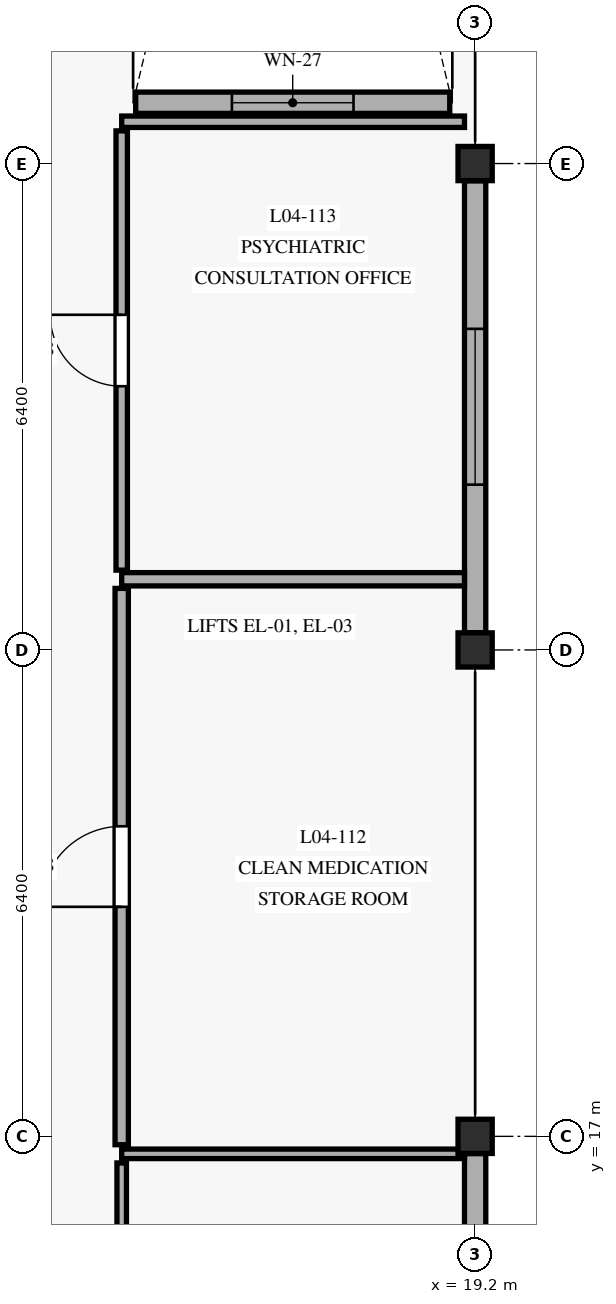
"""IFC4 building model, lengths in metres.
Left out: names, types, materials, properties, quantities, classifications, styles, units other than length and angle.
Written with IfcOpenShell. Run it as: python <this file> out.ifc"""

import sys

from ifc_helpers import new_model, si_unit, direction, frame, frame_2d, origin, origin_with_axes, origin_2d, place, context, subcontext, project, spatial, rectangle, extrude, element, fill, save


model = new_model("IFC4")
c1 = context("Model", 3, precision=1e-05, world=origin(), true_north=direction((0.0, 1.0)))
c2 = subcontext(c1, "Body", "Model", "MODEL_VIEW")
j1 = project(units=[si_unit("LENGTHUNIT", "METRE"), si_unit("PLANEANGLEUNIT", "RADIAN")], contexts=[c1])
p1 = place(None, origin())
s1 = spatial("IfcSite", under=j1, at=p1, CompositionType="ELEMENT")
p2 = place(p1, origin())
s2 = spatial("IfcBuilding", under=s1, at=p2, CompositionType="ELEMENT")
p3 = place(p2, frame((0.0, 0.0, 13.5)))
s3 = spatial("IfcBuildingStorey", under=s2, at=p3, CompositionType="ELEMENT", Elevation=13.5)
for number, where, z_axis, x_axis in (
    (1, (19.2, 17.0, 0.0), (0.0, 0.0, 1.0), (1.0, 0.0, 0.0)),
    (2, (19.2, 23.4, 0.0), (0.0, 0.0, 1.0), (1.0, 0.0, 0.0)),
    (3, (19.2, 29.8, 0.0), (0.0, 0.0, 1.0), (1.0, 0.0, 0.0)),
):
    element("IfcColumn", number, at=place(p3, frame(where, z_axis=z_axis, x_axis=x_axis)), inside=s3, PredefinedType="COLUMN", context=c2, shape_type="SweptSolid", body=[
        extrude(rectangle(XDim=0.45, YDim=0.45, at=origin_2d()), origin(), (0.0, 0.0, 1.0), 4.05),
    ])
p4 = place(p3, frame((19.2, 10.827, 0.0), z_axis=(0.0, 0.0, 1.0), x_axis=(0.0, 1.0, 0.0)))
e4 = element("IfcWall", 4, at=p4, inside=s3, PredefinedType="SOLIDWALL", context=c2, shape_type="SweptSolid", body=[
    extrude(rectangle(XDim=5.946, YDim=0.28, at=frame_2d((2.973, 0.0))), origin(), (0.0, 0.0, 1.0), 3.42),
])
p5 = place(p4, frame((1.948, 0.0, 0.8)))
e5 = element("IfcOpeningElement", 5, at=p5, cuts=e4, PredefinedType="OPENING", context=c2, shape_type="SweptSolid", body=[
    extrude(rectangle(XDim=2.05, YDim=1.95, at=frame_2d((1.025, 0.975))), frame((0.0, 0.15, 0.0), z_axis=(0.0, -1.0, 0.0), x_axis=(1.0, 0.0, 0.0)), (0.0, 0.0, 1.0), 0.3),
])
p6 = place(p3, frame((19.2, 23.627, 0.0), z_axis=(0.0, 0.0, 1.0), x_axis=(0.0, 1.0, 0.0)))
e6 = element("IfcWall", 6, at=p6, inside=s3, PredefinedType="SOLIDWALL", context=c2, shape_type="SweptSolid", body=[
    extrude(rectangle(XDim=5.946, YDim=0.28, at=frame_2d((2.973, 0.0))), origin(), (0.0, 0.0, 1.0), 3.42),
])
p7 = place(p6, frame((1.948, 0.0, 0.8)))
e7 = element("IfcOpeningElement", 7, at=p7, cuts=e6, PredefinedType="OPENING", context=c2, shape_type="SweptSolid", body=[
    extrude(rectangle(XDim=2.05, YDim=1.95, at=frame_2d((1.025, 0.975))), frame((0.0, 0.15, 0.0), z_axis=(0.0, -1.0, 0.0), x_axis=(1.0, 0.0, 0.0)), (0.0, 0.0, 1.0), 0.3),
])
p8 = place(p3, frame((18.866, 30.6, 0.0), z_axis=(0.0, 0.0, 1.0), x_axis=(-1.0, 0.0, 0.0)))
e8 = element("IfcWall", 8, at=p8, inside=s3, PredefinedType="SOLIDWALL", context=c2, shape_type="SweptSolid", body=[
    extrude(rectangle(XDim=4.132, YDim=0.28, at=frame_2d((2.066, 0.0))), origin(), (0.0, 0.0, 1.0), 3.75),
])
p9 = place(p8, frame((1.266, 0.0, 0.85)))
e9 = element("IfcOpeningElement", 9, at=p9, cuts=e8, PredefinedType="OPENING", context=c2, shape_type="SweptSolid", body=[
    extrude(rectangle(XDim=1.6, YDim=1.8, at=frame_2d((0.8, 0.9))), frame((0.0, 0.15, 0.0), z_axis=(0.0, -1.0, 0.0), x_axis=(1.0, 0.0, 0.0)), (0.0, 0.0, 1.0), 0.3),
])
p10 = place(p3, frame((14.55, 10.04, 0.0), z_axis=(0.0, 0.0, 1.0), x_axis=(0.0, 1.0, 0.0)))
e10 = element("IfcWall", 10, at=p10, inside=s3, PredefinedType="PARTITIONING", context=c2, shape_type="SweptSolid", body=[
    extrude(rectangle(XDim=6.61, YDim=0.125, at=frame_2d((3.305, 0.0))), origin(), (0.0, 0.0, 1.0), 3.345),
])
p11 = place(p10, frame((2.855, 0.0, 0.0)))
e11 = element("IfcOpeningElement", 11, at=p11, cuts=e10, PredefinedType="OPENING", context=c2, shape_type="SweptSolid", body=[
    extrude(rectangle(XDim=0.9, YDim=2.12, at=frame_2d((0.45, 1.06))), frame((0.0, 0.073, 0.0), z_axis=(0.0, -1.0, 0.0), x_axis=(1.0, 0.0, 0.0)), (0.0, 0.0, 1.0), 0.145),
])
p12 = place(p3, frame((14.55, 16.77, 0.0), z_axis=(0.0, 0.0, 1.0), x_axis=(1.0, 0.0, 0.0)))
e12 = element("IfcWall", 12, at=p12, inside=s3, PredefinedType="PARTITIONING", context=c2, shape_type="SweptSolid", body=[
    extrude(rectangle(XDim=4.51, YDim=0.125, at=frame_2d((2.255, 0.0))), origin(), (0.0, 0.0, 1.0), 3.345),
])
p13 = place(p3, frame((14.55, 16.89, 0.0), z_axis=(0.0, 0.0, 1.0), x_axis=(0.0, 1.0, 0.0)))
e13 = element("IfcWall", 13, at=p13, inside=s3, PredefinedType="PARTITIONING", context=c2, shape_type="SweptSolid", body=[
    extrude(rectangle(XDim=7.32, YDim=0.175, at=frame_2d((3.66, 0.0))), origin(), (0.0, 0.0, 1.0), 3.345),
])
p14 = place(p13, frame((3.13, 0.0, 0.0)))
e14 = element("IfcOpeningElement", 14, at=p14, cuts=e13, PredefinedType="OPENING", context=c2, shape_type="SweptSolid", body=[
    extrude(rectangle(XDim=1.06, YDim=2.2, at=frame_2d((0.53, 1.1))), frame((0.0, 0.098, 0.0), z_axis=(0.0, -1.0, 0.0), x_axis=(1.0, 0.0, 0.0)), (0.0, 0.0, 1.0), 0.195),
])
p15 = place(p3, frame((14.55, 24.33, 0.0), z_axis=(0.0, 0.0, 1.0), x_axis=(1.0, 0.0, 0.0)))
e15 = element("IfcWall", 15, at=p15, inside=s3, PredefinedType="PARTITIONING", context=c2, shape_type="SweptSolid", body=[
    extrude(rectangle(XDim=4.51, YDim=0.175, at=frame_2d((2.255, 0.0))), origin(), (0.0, 0.0, 1.0), 3.415),
])
p16 = place(p3, frame((14.55, 24.45, 0.0), z_axis=(0.0, 0.0, 1.0), x_axis=(0.0, 1.0, 0.0)))
e16 = element("IfcWall", 16, at=p16, inside=s3, PredefinedType="PARTITIONING", context=c2, shape_type="SweptSolid", body=[
    extrude(rectangle(XDim=5.78, YDim=0.15, at=frame_2d((2.89, 0.0))), origin(), (0.0, 0.0, 1.0), 3.345),
])
p17 = place(p16, frame((2.42, 0.0, 0.0)))
e17 = element("IfcOpeningElement", 17, at=p17, cuts=e16, PredefinedType="OPENING", context=c2, shape_type="SweptSolid", body=[
    extrude(rectangle(XDim=0.94, YDim=2.18, at=frame_2d((0.47, 1.09))), frame((0.0, 0.085, 0.0), z_axis=(0.0, -1.0, 0.0), x_axis=(1.0, 0.0, 0.0)), (0.0, 0.0, 1.0), 0.17),
])
p18 = place(p3, frame((14.55, 30.35, 0.0), z_axis=(0.0, 0.0, 1.0), x_axis=(1.0, 0.0, 0.0)))
e18 = element("IfcWall", 18, at=p18, inside=s3, PredefinedType="PARTITIONING", context=c2, shape_type="SweptSolid", body=[
    extrude(rectangle(XDim=4.51, YDim=0.15, at=frame_2d((2.255, 0.0))), origin(), (0.0, 0.0, 1.0), 3.415),
])
p19 = place(p7, origin_with_axes())
e19 = element("IfcWindow", 19, at=p19, inside=s3, PartitioningType="SINGLE_PANEL", PredefinedType="WINDOW", context=c2, shape_type="SweptSolid", body=[
    extrude(rectangle(XDim=2.05, YDim=1.95, at=frame_2d((1.025, 0.975))), frame((0.0, 0.03, 0.0), z_axis=(0.0, -1.0, 0.0), x_axis=(1.0, 0.0, 0.0)), (0.0, 0.0, 1.0), 0.06),
])
fill(e7, e19)
p20 = place(p9, origin_with_axes())
e20 = element("IfcWindow", 20, at=p20, inside=s3, PartitioningType="SINGLE_PANEL", PredefinedType="WINDOW", context=c2, shape_type="SweptSolid", body=[
    extrude(rectangle(XDim=1.6, YDim=1.8, at=frame_2d((0.8, 0.9))), frame((0.0, 0.03, 0.0), z_axis=(0.0, -1.0, 0.0), x_axis=(1.0, 0.0, 0.0)), (0.0, 0.0, 1.0), 0.06),
])
fill(e9, e20)
p21 = place(p14, frame((1.06, 0.0, 0.0), z_axis=(0.0, 0.0, 1.0), x_axis=(-1.0, 0.0, 0.0)))
e21 = element("IfcDoor", 21, at=p21, inside=s3, OperationType="SINGLE_SWING_RIGHT", PredefinedType="DOOR", context=c2, shape_type="SweptSolid", body=[
    extrude(rectangle(XDim=1.06, YDim=2.2, at=frame_2d((0.53, 1.1))), frame((0.0, 0.025, 0.0), z_axis=(0.0, -1.0, 0.0), x_axis=(1.0, 0.0, 0.0)), (0.0, 0.0, 1.0), 0.05),
])
fill(e14, e21)
p22 = place(p17, frame((0.94, 0.0, 0.0), z_axis=(0.0, 0.0, 1.0), x_axis=(-1.0, 0.0, 0.0)))
e22 = element("IfcDoor", 22, at=p22, inside=s3, OperationType="SINGLE_SWING_LEFT", PredefinedType="DOOR", context=c2, shape_type="SweptSolid", body=[
    extrude(rectangle(XDim=0.94, YDim=2.18, at=frame_2d((0.47, 1.09))), frame((0.0, 0.025, 0.0), z_axis=(0.0, -1.0, 0.0), x_axis=(1.0, 0.0, 0.0)), (0.0, 0.0, 1.0), 0.05),
])
fill(e17, e22)
save(model, sys.argv[1])
